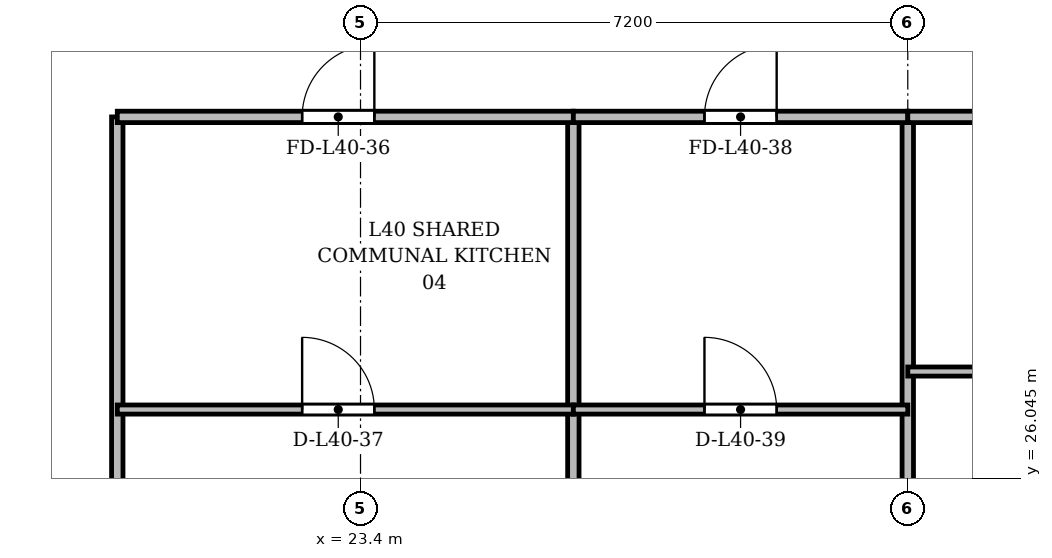
"""IFC4 building model, lengths in metres.
Left out: names, types, materials, properties, quantities, classifications, styles, units other than length and angle.
Written with IfcOpenShell. Run it as: python <this file> out.ifc"""

import sys

from ifc_helpers import new_model, si_unit, direction, frame, frame_2d, origin, place, context, subcontext, project, spatial, rectangle, extrude, source, transform, mapped, element, fill, save


model = new_model("IFC4")
c1 = context("Model", 3, precision=1e-05, world=origin(), true_north=direction((0.0, 1.0)))
c2 = subcontext(c1, "Body", "Model", "MODEL_VIEW")
j1 = project(units=[si_unit("LENGTHUNIT", "METRE"), si_unit("PLANEANGLEUNIT", "RADIAN")], contexts=[c1])
p1 = place(None, origin())
s1 = spatial("IfcSite", under=j1, at=p1, CompositionType="ELEMENT")
p2 = place(p1, origin())
s2 = spatial("IfcBuilding", under=s1, at=p2, CompositionType="ELEMENT")
p3 = place(p2, frame((0.0, 0.0, 153.7)))
s3 = spatial("IfcBuildingStorey", under=s2, at=p3, CompositionType="ELEMENT", Elevation=153.7)
p4 = place(p3, frame((26.2, 3.525, 0.0), z_axis=(0.0, 0.0, 1.0), x_axis=(0.0, 1.0, 0.0)))
e1 = element("IfcWall", 1, at=p4, inside=s3, PredefinedType="PARTITIONING", context=c2, shape_type="SweptSolid", body=[
    extrude(rectangle(XDim=27.275, YDim=0.15, at=frame_2d((13.638, 0.0))), origin(), (0.0, 0.0, 1.0), 2.75),
])
p5 = place(p3, frame((30.6, 3.525, 0.0), z_axis=(0.0, 0.0, 1.0), x_axis=(0.0, 1.0, 0.0)))
e2 = element("IfcWall", 2, at=p5, inside=s3, PredefinedType="PARTITIONING", context=c2, shape_type="SweptSolid", body=[
    extrude(rectangle(XDim=27.275, YDim=0.15, at=frame_2d((13.638, 0.0))), origin(), (0.0, 0.0, 1.0), 2.85),
])
p6 = place(p3, frame((20.2, 3.525, 0.0), z_axis=(0.0, 0.0, 1.0), x_axis=(0.0, 1.0, 0.0)))
e3 = element("IfcWall", 3, at=p6, inside=s3, PredefinedType="PARTITIONING", context=c2, shape_type="SweptSolid", body=[
    extrude(rectangle(XDim=27.275, YDim=0.15, at=frame_2d((13.638, 0.0))), origin(), (0.0, 0.0, 1.0), 2.75),
])
p7 = place(p3, frame((20.2, 30.8, 0.0), z_axis=(0.0, 0.0, 1.0), x_axis=(1.0, 0.0, 0.0)))
e4 = element("IfcWall", 4, at=p7, inside=s3, PredefinedType="PARTITIONING", context=c2, shape_type="SweptSolid", body=[
    extrude(rectangle(XDim=6.0, YDim=0.15, at=frame_2d((3.0, 0.0))), origin(), (0.0, 0.0, 1.0), 2.85),
])
p8 = place(p7, frame((2.432, 0.0, 0.0)))
e5 = element("IfcOpeningElement", 5, at=p8, cuts=e4, PredefinedType="OPENING", context=c2, shape_type="SweptSolid", body=[
    extrude(rectangle(XDim=0.95, YDim=2.15, at=frame_2d((0.475, 1.075))), frame((0.0, 0.085, 0.0), z_axis=(0.0, -1.0, 0.0), x_axis=(1.0, 0.0, 0.0)), (0.0, 0.0, 1.0), 0.17),
])
p9 = place(p3, frame((20.2, 26.95, 0.0), z_axis=(0.0, 0.0, 1.0), x_axis=(1.0, 0.0, 0.0)))
e6 = element("IfcWall", 6, at=p9, inside=s3, PredefinedType="PARTITIONING", context=c2, shape_type="SweptSolid", body=[
    extrude(rectangle(XDim=6.0, YDim=0.12, at=frame_2d((3.0, 0.0))), origin(), (0.0, 0.0, 1.0), 2.85),
])
p10 = place(p9, frame((2.432, 0.0, 0.0)))
e7 = element("IfcOpeningElement", 7, at=p10, cuts=e6, PredefinedType="OPENING", context=c2, shape_type="SweptSolid", body=[
    extrude(rectangle(XDim=0.95, YDim=2.15, at=frame_2d((0.475, 1.075))), frame((0.0, 0.07, 0.0), z_axis=(0.0, -1.0, 0.0), x_axis=(1.0, 0.0, 0.0)), (0.0, 0.0, 1.0), 0.14),
])
p11 = place(p3, frame((26.2, 30.8, 0.0), z_axis=(0.0, 0.0, 1.0), x_axis=(1.0, 0.0, 0.0)))
e8 = element("IfcWall", 8, at=p11, inside=s3, PredefinedType="PARTITIONING", context=c2, shape_type="SweptSolid", body=[
    extrude(rectangle(XDim=4.4, YDim=0.15, at=frame_2d((2.2, 0.0))), origin(), (0.0, 0.0, 1.0), 2.85),
])
p12 = place(p11, frame((1.725, 0.0, 0.0)))
e9 = element("IfcOpeningElement", 9, at=p12, cuts=e8, PredefinedType="OPENING", context=c2, shape_type="SweptSolid", body=[
    extrude(rectangle(XDim=0.95, YDim=2.15, at=frame_2d((0.475, 1.075))), frame((0.0, 0.085, 0.0), z_axis=(0.0, -1.0, 0.0), x_axis=(1.0, 0.0, 0.0)), (0.0, 0.0, 1.0), 0.17),
])
p13 = place(p3, frame((26.2, 26.95, 0.0), z_axis=(0.0, 0.0, 1.0), x_axis=(1.0, 0.0, 0.0)))
e10 = element("IfcWall", 10, at=p13, inside=s3, PredefinedType="PARTITIONING", context=c2, shape_type="SweptSolid", body=[
    extrude(rectangle(XDim=4.4, YDim=0.12, at=frame_2d((2.2, 0.0))), origin(), (0.0, 0.0, 1.0), 2.85),
])
p14 = place(p13, frame((1.725, 0.0, 0.0)))
e11 = element("IfcOpeningElement", 11, at=p14, cuts=e10, PredefinedType="OPENING", context=c2, shape_type="SweptSolid", body=[
    extrude(rectangle(XDim=0.95, YDim=2.15, at=frame_2d((0.475, 1.075))), frame((0.0, 0.07, 0.0), z_axis=(0.0, -1.0, 0.0), x_axis=(1.0, 0.0, 0.0)), (0.0, 0.0, 1.0), 0.14),
])
p15 = place(p3, frame((30.6, 27.45, 0.0), z_axis=(0.0, 0.0, 1.0), x_axis=(1.0, 0.0, 0.0)))
e12 = element("IfcWall", 12, at=p15, inside=s3, PredefinedType="PARTITIONING", context=c2, shape_type="SweptSolid", body=[
    extrude(rectangle(XDim=2.09, YDim=0.12, at=frame_2d((1.045, 0.0))), origin(), (0.0, 0.0, 1.0), 2.85),
])
p16 = place(p3, frame((30.6, 30.8, 0.0), z_axis=(0.0, 0.0, 1.0), x_axis=(1.0, 0.0, 0.0)))
e13 = element("IfcWall", 13, at=p16, inside=s3, PredefinedType="PARTITIONING", context=c2, shape_type="SweptSolid", body=[
    extrude(rectangle(XDim=6.0, YDim=0.15, at=frame_2d((3.0, 0.0))), origin(), (0.0, 0.0, 1.0), 2.85),
])
p17 = place(p16, frame((3.865, 0.0, 0.0)))
e14 = element("IfcOpeningElement", 14, at=p17, cuts=e13, PredefinedType="OPENING", context=c2, shape_type="SweptSolid", body=[
    extrude(rectangle(XDim=0.95, YDim=2.15, at=frame_2d((0.475, 1.075))), frame((0.0, 0.085, 0.0), z_axis=(0.0, -1.0, 0.0), x_axis=(1.0, 0.0, 0.0)), (0.0, 0.0, 1.0), 0.17),
])
m1 = source(origin(), c2, "Body", "SweptSolid", [
    extrude(rectangle(XDim=0.95, YDim=2.15, at=frame_2d((0.475, 1.075))), frame((0.0, 0.025, 0.0), z_axis=(0.0, -1.0, 0.0), x_axis=(1.0, 0.0, 0.0)), (0.0, 0.0, 1.0), 0.05),
])
p18 = place(p8, origin())
e15 = element("IfcDoor", 15, at=p18, inside=s3, OperationType="SINGLE_SWING_RIGHT", PredefinedType="DOOR", context=c2, shape_type="MappedRepresentation", body=[
    mapped(m1, transform((0.0, 0.0, 0.0), x_axis=(1.0, 0.0, 0.0), y_axis=(0.0, 1.0, 0.0), z_axis=(0.0, 0.0, 1.0), scale=1.0)),
])
fill(e5, e15)
p19 = place(p10, origin())
e16 = element("IfcDoor", 16, at=p19, inside=s3, OperationType="SINGLE_SWING_LEFT", PredefinedType="DOOR", context=c2, shape_type="MappedRepresentation", body=[
    mapped(m1, transform((0.0, 0.0, 0.0), x_axis=(1.0, 0.0, 0.0), y_axis=(0.0, 1.0, 0.0), z_axis=(0.0, 0.0, 1.0), scale=1.0)),
])
fill(e7, e16)
p20 = place(p12, origin())
e17 = element("IfcDoor", 17, at=p20, inside=s3, OperationType="SINGLE_SWING_RIGHT", PredefinedType="DOOR", context=c2, shape_type="MappedRepresentation", body=[
    mapped(m1, transform((0.0, 0.0, 0.0), x_axis=(1.0, 0.0, 0.0), y_axis=(0.0, 1.0, 0.0), z_axis=(0.0, 0.0, 1.0), scale=1.0)),
])
fill(e9, e17)
p21 = place(p14, origin())
e18 = element("IfcDoor", 18, at=p21, inside=s3, OperationType="SINGLE_SWING_LEFT", PredefinedType="DOOR", context=c2, shape_type="MappedRepresentation", body=[
    mapped(m1, transform((0.0, 0.0, 0.0), x_axis=(1.0, 0.0, 0.0), y_axis=(0.0, 1.0, 0.0), z_axis=(0.0, 0.0, 1.0), scale=1.0)),
])
fill(e11, e18)
save(model, sys.argv[1])
